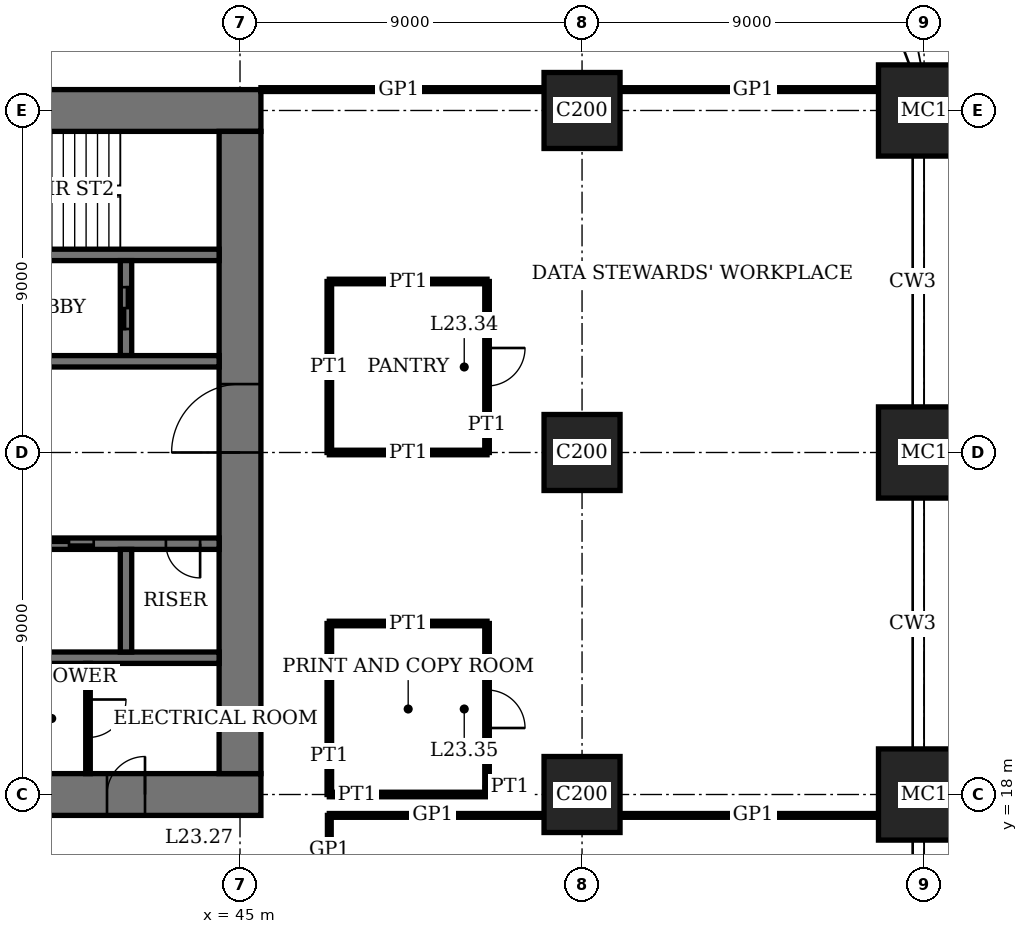
"""IFC4 building model, lengths in metres.
Left out: names, types, materials, properties, quantities, classifications, styles, units other than length and angle.
Written with IfcOpenShell. Run it as: python <this file> out.ifc"""

import sys

from ifc_helpers import new_model, si_unit, direction, frame, frame_2d, origin, origin_2d, place, context, subcontext, project, spatial, rectangle, extrude, element, fill, save


model = new_model("IFC4")
c1 = context("Model", 3, precision=1e-05, world=origin(), true_north=direction((0.0, 1.0)))
c2 = subcontext(c1, "Body", "Model", "MODEL_VIEW")
j1 = project(units=[si_unit("LENGTHUNIT", "METRE"), si_unit("PLANEANGLEUNIT", "RADIAN")], contexts=[c1])
p1 = place(None, origin())
s1 = spatial("IfcSite", under=j1, at=p1, CompositionType="ELEMENT")
p2 = place(p1, origin())
s2 = spatial("IfcBuilding", under=s1, at=p2, CompositionType="ELEMENT")
p3 = place(p2, frame((0.0, 0.0, 97.0)))
s3 = spatial("IfcBuildingStorey", under=s2, at=p3, CompositionType="ELEMENT", Elevation=97.0)
for number, where, z_axis, x_axis in (
    (1, (54.0, 18.0, 0.0), (0.0, 0.0, 1.0), (1.0, 0.0, 0.0)),
    (2, (54.0, 27.0, 0.0), (0.0, 0.0, 1.0), (1.0, 0.0, 0.0)),
    (3, (54.0, 36.0, 0.0), (0.0, 0.0, 1.0), (1.0, 0.0, 0.0)),
):
    element("IfcColumn", number, at=place(p3, frame(where, z_axis=z_axis, x_axis=x_axis)), inside=s3, PredefinedType="COLUMN", context=c2, shape_type="SweptSolid", body=[
        extrude(rectangle(XDim=2.0, YDim=2.0, at=origin_2d()), origin(), (0.0, 0.0, 1.0), 4.0),
    ])
for number, where, z_axis, x_axis in (
    (4, (63.0, 18.0, 0.0), (0.0, 0.0, 1.0), (1.0, 0.0, 0.0)),
    (5, (63.0, 27.0, 0.0), (0.0, 0.0, 1.0), (1.0, 0.0, 0.0)),
    (6, (63.0, 36.0, 0.0), (0.0, 0.0, 1.0), (1.0, 0.0, 0.0)),
):
    element("IfcColumn", number, at=place(p3, frame(where, z_axis=z_axis, x_axis=x_axis)), inside=s3, PredefinedType="COLUMN", context=c2, shape_type="SweptSolid", body=[
        extrude(rectangle(XDim=2.4, YDim=2.4, at=origin_2d()), origin(), (0.0, 0.0, 1.0), 4.0),
    ])
p4 = place(p3, frame((17.45, 18.0, 0.0), z_axis=(0.0, 0.0, 1.0), x_axis=(1.0, 0.0, 0.0)))
e7 = element("IfcWall", 7, at=p4, inside=s3, PredefinedType="SHEAR", context=c2, shape_type="SweptSolid", body=[
    extrude(rectangle(XDim=28.1, YDim=1.1, at=frame_2d((14.05, 0.0))), origin(), (0.0, 0.0, 1.0), 4.0),
])
p5 = place(p4, frame((11.55, 0.0, 0.0)))
e8 = element("IfcOpeningElement", 8, at=p5, cuts=e7, PredefinedType="OPENING", context=c2, shape_type="SweptSolid", body=[
    extrude(rectangle(XDim=1.0, YDim=2.4, at=frame_2d((0.5, 1.2))), frame((0.0, 0.56, 0.0), z_axis=(0.0, -1.0, 0.0), x_axis=(1.0, 0.0, 0.0)), (0.0, 0.0, 1.0), 1.12),
])
p6 = place(p4, frame((16.55, 0.0, 0.0)))
e9 = element("IfcOpeningElement", 9, at=p6, cuts=e7, PredefinedType="OPENING", context=c2, shape_type="SweptSolid", body=[
    extrude(rectangle(XDim=1.0, YDim=2.4, at=frame_2d((0.5, 1.2))), frame((0.0, 0.56, 0.0), z_axis=(0.0, -1.0, 0.0), x_axis=(1.0, 0.0, 0.0)), (0.0, 0.0, 1.0), 1.12),
])
p7 = place(p4, frame((20.0, 0.0, 0.0)))
e10 = element("IfcOpeningElement", 10, at=p7, cuts=e7, PredefinedType="OPENING", context=c2, shape_type="SweptSolid", body=[
    extrude(rectangle(XDim=1.1, YDim=2.4, at=frame_2d((0.55, 1.2))), frame((0.0, 0.56, 0.0), z_axis=(0.0, -1.0, 0.0), x_axis=(1.0, 0.0, 0.0)), (0.0, 0.0, 1.0), 1.12),
])
p8 = place(p4, frame((24.05, 0.0, 0.0)))
e11 = element("IfcOpeningElement", 11, at=p8, cuts=e7, PredefinedType="OPENING", context=c2, shape_type="SweptSolid", body=[
    extrude(rectangle(XDim=1.0, YDim=2.4, at=frame_2d((0.5, 1.2))), frame((0.0, 0.56, 0.0), z_axis=(0.0, -1.0, 0.0), x_axis=(1.0, 0.0, 0.0)), (0.0, 0.0, 1.0), 1.12),
])
p9 = place(p3, frame((45.55, 36.0, 0.0), z_axis=(0.0, 0.0, 1.0), x_axis=(-1.0, 0.0, 0.0)))
e12 = element("IfcWall", 12, at=p9, inside=s3, PredefinedType="SHEAR", context=c2, shape_type="SweptSolid", body=[
    extrude(rectangle(XDim=28.1, YDim=1.1, at=frame_2d((14.05, 0.0))), origin(), (0.0, 0.0, 1.0), 4.0),
])
p10 = place(p9, frame((11.55, 0.0, 0.0)))
e13 = element("IfcOpeningElement", 13, at=p10, cuts=e12, PredefinedType="OPENING", context=c2, shape_type="SweptSolid", body=[
    extrude(rectangle(XDim=1.0, YDim=2.4, at=frame_2d((0.5, 1.2))), frame((0.0, 0.56, 0.0), z_axis=(0.0, -1.0, 0.0), x_axis=(1.0, 0.0, 0.0)), (0.0, 0.0, 1.0), 1.12),
])
p11 = place(p9, frame((16.55, 0.0, 0.0)))
e14 = element("IfcOpeningElement", 14, at=p11, cuts=e12, PredefinedType="OPENING", context=c2, shape_type="SweptSolid", body=[
    extrude(rectangle(XDim=1.0, YDim=2.4, at=frame_2d((0.5, 1.2))), frame((0.0, 0.56, 0.0), z_axis=(0.0, -1.0, 0.0), x_axis=(1.0, 0.0, 0.0)), (0.0, 0.0, 1.0), 1.12),
])
p12 = place(p9, frame((20.0, 0.0, 0.0)))
e15 = element("IfcOpeningElement", 15, at=p12, cuts=e12, PredefinedType="OPENING", context=c2, shape_type="SweptSolid", body=[
    extrude(rectangle(XDim=1.1, YDim=2.4, at=frame_2d((0.55, 1.2))), frame((0.0, 0.56, 0.0), z_axis=(0.0, -1.0, 0.0), x_axis=(1.0, 0.0, 0.0)), (0.0, 0.0, 1.0), 1.12),
])
p13 = place(p9, frame((24.05, 0.0, 0.0)))
e16 = element("IfcOpeningElement", 16, at=p13, cuts=e12, PredefinedType="OPENING", context=c2, shape_type="SweptSolid", body=[
    extrude(rectangle(XDim=1.0, YDim=2.4, at=frame_2d((0.5, 1.2))), frame((0.0, 0.56, 0.0), z_axis=(0.0, -1.0, 0.0), x_axis=(1.0, 0.0, 0.0)), (0.0, 0.0, 1.0), 1.12),
])
p14 = place(p3, frame((45.0, 18.55, 0.0), z_axis=(0.0, 0.0, 1.0), x_axis=(0.0, 1.0, 0.0)))
e17 = element("IfcWall", 17, at=p14, inside=s3, PredefinedType="SHEAR", context=c2, shape_type="SweptSolid", body=[
    extrude(rectangle(XDim=16.9, YDim=1.1, at=frame_2d((8.45, 0.0))), origin(), (0.0, 0.0, 1.0), 4.0),
])
p15 = place(p14, frame((8.45, 0.0, 0.0)))
e18 = element("IfcOpeningElement", 18, at=p15, cuts=e17, PredefinedType="OPENING", context=c2, shape_type="SweptSolid", body=[
    extrude(rectangle(XDim=1.8, YDim=2.4, at=frame_2d((0.9, 1.2))), frame((0.0, 0.56, 0.0), z_axis=(0.0, -1.0, 0.0), x_axis=(1.0, 0.0, 0.0)), (0.0, 0.0, 1.0), 1.12),
])
p16 = place(p3, frame((36.15, 32.2, 0.0), z_axis=(0.0, 0.0, 1.0), x_axis=(1.0, 0.0, 0.0)))
e19 = element("IfcWall", 19, at=p16, inside=s3, PredefinedType="SHEAR", context=c2, shape_type="SweptSolid", body=[
    extrude(rectangle(XDim=8.3, YDim=0.3, at=frame_2d((4.15, 0.0))), origin(), (0.0, 0.0, 1.0), 4.0),
])
p17 = place(p16, frame((0.45, 0.0, 0.0)))
e20 = element("IfcOpeningElement", 20, at=p17, cuts=e19, PredefinedType="OPENING", context=c2, shape_type="SweptSolid", body=[
    extrude(rectangle(XDim=1.0, YDim=2.4, at=frame_2d((0.5, 1.2))), frame((0.0, 0.16, 0.0), z_axis=(0.0, -1.0, 0.0), x_axis=(1.0, 0.0, 0.0)), (0.0, 0.0, 1.0), 0.32),
])
p18 = place(p3, frame((42.0, 29.55, 0.0), z_axis=(0.0, 0.0, 1.0), x_axis=(0.0, 1.0, 0.0)))
e21 = element("IfcWall", 21, at=p18, inside=s3, PredefinedType="SHEAR", context=c2, shape_type="SweptSolid", body=[
    extrude(rectangle(XDim=2.5, YDim=0.3, at=frame_2d((1.25, 0.0))), origin(), (0.0, 0.0, 1.0), 4.0),
])
p19 = place(p18, frame((0.7, 0.0, 0.0)))
e22 = element("IfcOpeningElement", 22, at=p19, cuts=e21, PredefinedType="OPENING", context=c2, shape_type="SweptSolid", body=[
    extrude(rectangle(XDim=1.1, YDim=2.4, at=frame_2d((0.55, 1.2))), frame((0.0, 0.16, 0.0), z_axis=(0.0, -1.0, 0.0), x_axis=(1.0, 0.0, 0.0)), (0.0, 0.0, 1.0), 0.32),
])
p20 = place(p3, frame((18.55, 24.6, 0.0), z_axis=(0.0, 0.0, 1.0), x_axis=(1.0, 0.0, 0.0)))
e23 = element("IfcWall", 23, at=p20, inside=s3, PredefinedType="SHEAR", context=c2, shape_type="SweptSolid", body=[
    extrude(rectangle(XDim=25.9, YDim=0.3, at=frame_2d((12.95, 0.0))), origin(), (0.0, 0.0, 1.0), 4.0),
])
p21 = place(p20, frame((4.95, 0.0, 0.0)))
e24 = element("IfcOpeningElement", 24, at=p21, cuts=e23, PredefinedType="OPENING", context=c2, shape_type="SweptSolid", body=[
    extrude(rectangle(XDim=1.0, YDim=2.4, at=frame_2d((0.5, 1.2))), frame((0.0, 0.16, 0.0), z_axis=(0.0, -1.0, 0.0), x_axis=(1.0, 0.0, 0.0)), (0.0, 0.0, 1.0), 0.32),
])
p22 = place(p20, frame((24.5, 0.0, 0.0)))
e25 = element("IfcOpeningElement", 25, at=p22, cuts=e23, PredefinedType="OPENING", context=c2, shape_type="SweptSolid", body=[
    extrude(rectangle(XDim=0.9, YDim=2.1, at=frame_2d((0.45, 1.05))), frame((0.0, 0.16, 0.0), z_axis=(0.0, -1.0, 0.0), x_axis=(1.0, 0.0, 0.0)), (0.0, 0.0, 1.0), 0.32),
])
p23 = place(p20, frame((21.3, 0.0, 0.0)))
e26 = element("IfcOpeningElement", 26, at=p23, cuts=e23, PredefinedType="OPENING", context=c2, shape_type="SweptSolid", body=[
    extrude(rectangle(XDim=1.3, YDim=2.4, at=frame_2d((0.65, 1.2))), frame((0.0, 0.16, 0.0), z_axis=(0.0, -1.0, 0.0), x_axis=(1.0, 0.0, 0.0)), (0.0, 0.0, 1.0), 0.32),
])
p24 = place(p3, frame((18.55, 29.4, 0.0), z_axis=(0.0, 0.0, 1.0), x_axis=(1.0, 0.0, 0.0)))
e27 = element("IfcWall", 27, at=p24, inside=s3, PredefinedType="SHEAR", context=c2, shape_type="SweptSolid", body=[
    extrude(rectangle(XDim=25.9, YDim=0.3, at=frame_2d((12.95, 0.0))), origin(), (0.0, 0.0, 1.0), 4.0),
])
p25 = place(p24, frame((19.95, 0.0, 0.0)))
e28 = element("IfcOpeningElement", 28, at=p25, cuts=e27, PredefinedType="OPENING", context=c2, shape_type="SweptSolid", body=[
    extrude(rectangle(XDim=1.0, YDim=2.4, at=frame_2d((0.5, 1.2))), frame((0.0, 0.16, 0.0), z_axis=(0.0, -1.0, 0.0), x_axis=(1.0, 0.0, 0.0)), (0.0, 0.0, 1.0), 0.32),
])
p26 = place(p24, frame((0.5, 0.0, 0.0)))
e29 = element("IfcOpeningElement", 29, at=p26, cuts=e27, PredefinedType="OPENING", context=c2, shape_type="SweptSolid", body=[
    extrude(rectangle(XDim=0.9, YDim=2.1, at=frame_2d((0.45, 1.05))), frame((0.0, 0.16, 0.0), z_axis=(0.0, -1.0, 0.0), x_axis=(1.0, 0.0, 0.0)), (0.0, 0.0, 1.0), 0.32),
])
p27 = place(p24, frame((15.4, 0.0, 0.0)))
e30 = element("IfcOpeningElement", 30, at=p27, cuts=e27, PredefinedType="OPENING", context=c2, shape_type="SweptSolid", body=[
    extrude(rectangle(XDim=1.1, YDim=2.4, at=frame_2d((0.55, 1.2))), frame((0.0, 0.16, 0.0), z_axis=(0.0, -1.0, 0.0), x_axis=(1.0, 0.0, 0.0)), (0.0, 0.0, 1.0), 0.32),
])
p28 = place(p24, frame((12.4, 0.0, 0.0)))
e31 = element("IfcOpeningElement", 31, at=p28, cuts=e27, PredefinedType="OPENING", context=c2, shape_type="SweptSolid", body=[
    extrude(rectangle(XDim=1.1, YDim=2.4, at=frame_2d((0.55, 1.2))), frame((0.0, 0.16, 0.0), z_axis=(0.0, -1.0, 0.0), x_axis=(1.0, 0.0, 0.0)), (0.0, 0.0, 1.0), 0.32),
])
p29 = place(p24, frame((3.3, 0.0, 0.0)))
e32 = element("IfcOpeningElement", 32, at=p29, cuts=e27, PredefinedType="OPENING", context=c2, shape_type="SweptSolid", body=[
    extrude(rectangle(XDim=1.3, YDim=2.4, at=frame_2d((0.65, 1.2))), frame((0.0, 0.16, 0.0), z_axis=(0.0, -1.0, 0.0), x_axis=(1.0, 0.0, 0.0)), (0.0, 0.0, 1.0), 0.32),
])
p30 = place(p3, frame((27.15, 21.6, 0.0), z_axis=(0.0, 0.0, 1.0), x_axis=(1.0, 0.0, 0.0)))
e33 = element("IfcWall", 33, at=p30, inside=s3, PredefinedType="SHEAR", context=c2, shape_type="SweptSolid", body=[
    extrude(rectangle(XDim=17.3, YDim=0.3, at=frame_2d((8.65, 0.0))), origin(), (0.0, 0.0, 1.0), 4.0),
])
p31 = place(p3, frame((42.0, 21.75, 0.0), z_axis=(0.0, 0.0, 1.0), x_axis=(0.0, 1.0, 0.0)))
e34 = element("IfcWall", 34, at=p31, inside=s3, PredefinedType="SHEAR", context=c2, shape_type="SweptSolid", body=[
    extrude(rectangle(XDim=2.7, YDim=0.3, at=frame_2d((1.35, 0.0))), origin(), (0.0, 0.0, 1.0), 4.0),
])
p32 = place(p3, frame((47.35, 17.45, 0.0), z_axis=(0.0, 0.0, 1.0), x_axis=(1.0, 0.0, 0.0)))
e35 = element("IfcWall", 35, at=p32, inside=s3, PredefinedType="PARTITIONING", context=c2, shape_type="SweptSolid", body=[
    extrude(rectangle(XDim=5.65, YDim=0.1, at=frame_2d((2.825, 0.0))), origin(), (0.0, 0.0, 1.0), 3.75),
])
p33 = place(p3, frame((55.0, 17.45, 0.0), z_axis=(0.0, 0.0, 1.0), x_axis=(1.0, 0.0, 0.0)))
e36 = element("IfcWall", 36, at=p33, inside=s3, PredefinedType="PARTITIONING", context=c2, shape_type="SweptSolid", body=[
    extrude(rectangle(XDim=6.8, YDim=0.1, at=frame_2d((3.4, 0.0))), origin(), (0.0, 0.0, 1.0), 3.75),
])
p34 = place(p3, frame((47.35, 18.0, 0.0), z_axis=(0.0, 0.0, 1.0), x_axis=(1.0, 0.0, 0.0)))
e37 = element("IfcWall", 37, at=p34, inside=s3, PredefinedType="PARTITIONING", context=c2, shape_type="SweptSolid", body=[
    extrude(rectangle(XDim=4.15, YDim=0.12, at=frame_2d((2.075, 0.0))), origin(), (0.0, 0.0, 1.0), 3.05),
])
p35 = place(p3, frame((47.35, 22.5, 0.0), z_axis=(0.0, 0.0, 1.0), x_axis=(1.0, 0.0, 0.0)))
e38 = element("IfcWall", 38, at=p35, inside=s3, PredefinedType="PARTITIONING", context=c2, shape_type="SweptSolid", body=[
    extrude(rectangle(XDim=4.15, YDim=0.12, at=frame_2d((2.075, 0.0))), origin(), (0.0, 0.0, 1.0), 3.1),
])
p36 = place(p3, frame((47.35, 27.0, 0.0), z_axis=(0.0, 0.0, 1.0), x_axis=(1.0, 0.0, 0.0)))
e39 = element("IfcWall", 39, at=p36, inside=s3, PredefinedType="PARTITIONING", context=c2, shape_type="SweptSolid", body=[
    extrude(rectangle(XDim=4.15, YDim=0.12, at=frame_2d((2.075, 0.0))), origin(), (0.0, 0.0, 1.0), 3.05),
])
p37 = place(p3, frame((47.35, 31.5, 0.0), z_axis=(0.0, 0.0, 1.0), x_axis=(1.0, 0.0, 0.0)))
e40 = element("IfcWall", 40, at=p37, inside=s3, PredefinedType="PARTITIONING", context=c2, shape_type="SweptSolid", body=[
    extrude(rectangle(XDim=4.15, YDim=0.12, at=frame_2d((2.075, 0.0))), origin(), (0.0, 0.0, 1.0), 3.1),
])
p38 = place(p3, frame((45.55, 36.55, 0.0), z_axis=(0.0, 0.0, 1.0), x_axis=(1.0, 0.0, 0.0)))
e41 = element("IfcWall", 41, at=p38, inside=s3, PredefinedType="PARTITIONING", context=c2, shape_type="SweptSolid", body=[
    extrude(rectangle(XDim=7.45, YDim=0.1, at=frame_2d((3.725, 0.0))), origin(), (0.0, 0.0, 1.0), 3.75),
])
p39 = place(p3, frame((55.0, 36.55, 0.0), z_axis=(0.0, 0.0, 1.0), x_axis=(1.0, 0.0, 0.0)))
e42 = element("IfcWall", 42, at=p39, inside=s3, PredefinedType="PARTITIONING", context=c2, shape_type="SweptSolid", body=[
    extrude(rectangle(XDim=6.8, YDim=0.1, at=frame_2d((3.4, 0.0))), origin(), (0.0, 0.0, 1.0), 3.75),
])
for number, where, z_axis, x_axis in (
    (43, (47.35, 27.0, 0.0), (0.0, 0.0, 1.0), (0.0, 1.0, 0.0)),
    (44, (47.35, 18.0, 0.0), (0.0, 0.0, 1.0), (0.0, 1.0, 0.0)),
):
    element("IfcWall", number, at=place(p3, frame(where, z_axis=z_axis, x_axis=x_axis)), inside=s3, PredefinedType="PARTITIONING", context=c2, shape_type="SweptSolid", body=[
        extrude(rectangle(XDim=4.5, YDim=0.12, at=frame_2d((2.25, 0.0))), origin(), (0.0, 0.0, 1.0), 3.75),
    ])
p40 = place(p3, frame((47.35, 15.65, 0.0), z_axis=(0.0, 0.0, 1.0), x_axis=(0.0, 1.0, 0.0)))
e45 = element("IfcWall", 45, at=p40, inside=s3, PredefinedType="PARTITIONING", context=c2, shape_type="SweptSolid", body=[
    extrude(rectangle(XDim=1.8, YDim=0.1, at=frame_2d((0.9, 0.0))), origin(), (0.0, 0.0, 1.0), 3.75),
])
p41 = place(p3, frame((51.5, 27.0, 0.0), z_axis=(0.0, 0.0, 1.0), x_axis=(0.0, 1.0, 0.0)))
e46 = element("IfcWall", 46, at=p41, inside=s3, PredefinedType="PARTITIONING", context=c2, shape_type="SweptSolid", body=[
    extrude(rectangle(XDim=4.5, YDim=0.12, at=frame_2d((2.25, 0.0))), origin(), (0.0, 0.0, 1.0), 3.75),
])
p42 = place(p41, frame((1.75, 0.0, 0.0)))
e47 = element("IfcOpeningElement", 47, at=p42, cuts=e46, PredefinedType="OPENING", context=c2, shape_type="SweptSolid", body=[
    extrude(rectangle(XDim=1.0, YDim=2.4, at=frame_2d((0.5, 1.2))), frame((0.0, 0.07, 0.0), z_axis=(0.0, -1.0, 0.0), x_axis=(1.0, 0.0, 0.0)), (0.0, 0.0, 1.0), 0.14),
])
p43 = place(p3, frame((51.5, 18.0, 0.0), z_axis=(0.0, 0.0, 1.0), x_axis=(0.0, 1.0, 0.0)))
e48 = element("IfcWall", 48, at=p43, inside=s3, PredefinedType="PARTITIONING", context=c2, shape_type="SweptSolid", body=[
    extrude(rectangle(XDim=4.5, YDim=0.12, at=frame_2d((2.25, 0.0))), origin(), (0.0, 0.0, 1.0), 3.75),
])
p44 = place(p43, frame((1.75, 0.0, 0.0)))
e49 = element("IfcOpeningElement", 49, at=p44, cuts=e48, PredefinedType="OPENING", context=c2, shape_type="SweptSolid", body=[
    extrude(rectangle(XDim=1.0, YDim=2.4, at=frame_2d((0.5, 1.2))), frame((0.0, 0.07, 0.0), z_axis=(0.0, -1.0, 0.0), x_axis=(1.0, 0.0, 0.0)), (0.0, 0.0, 1.0), 0.14),
])
p45 = place(p3, frame((41.0, 18.55, 0.0), z_axis=(0.0, 0.0, 1.0), x_axis=(0.0, 1.0, 0.0)))
e50 = element("IfcWall", 50, at=p45, inside=s3, PredefinedType="PARTITIONING", context=c2, shape_type="SweptSolid", body=[
    extrude(rectangle(XDim=2.9, YDim=0.12, at=frame_2d((1.45, 0.0))), origin(), (0.0, 0.0, 1.0), 3.75),
])
p46 = place(p45, frame((0.95, 0.0, 0.0)))
e51 = element("IfcOpeningElement", 51, at=p46, cuts=e50, PredefinedType="OPENING", context=c2, shape_type="SweptSolid", body=[
    extrude(rectangle(XDim=1.0, YDim=2.4, at=frame_2d((0.5, 1.2))), frame((0.0, 0.07, 0.0), z_axis=(0.0, -1.0, 0.0), x_axis=(1.0, 0.0, 0.0)), (0.0, 0.0, 1.0), 0.14),
])
p47 = place(p15, origin())
e52 = element("IfcDoor", 52, at=p47, inside=s3, OperationType="DOUBLE_DOOR_DOUBLE_SWING", PredefinedType="DOOR", context=c2, shape_type="SweptSolid", body=[
    extrude(rectangle(XDim=1.8, YDim=2.4, at=frame_2d((0.9, 1.2))), frame((0.0, 0.03, 0.0), z_axis=(0.0, -1.0, 0.0), x_axis=(1.0, 0.0, 0.0)), (0.0, 0.0, 1.0), 0.06),
    extrude(rectangle(XDim=0.04, YDim=2.4, at=frame_2d((0.02, 1.2))), frame((0.0, 0.55, 0.0), z_axis=(0.0, -1.0, 0.0), x_axis=(1.0, 0.0, 0.0)), (0.0, 0.0, 1.0), 1.1),
    extrude(rectangle(XDim=0.04, YDim=2.4, at=frame_2d((1.78, 1.2))), frame((0.0, 0.55, 0.0), z_axis=(0.0, -1.0, 0.0), x_axis=(1.0, 0.0, 0.0)), (0.0, 0.0, 1.0), 1.1),
    extrude(rectangle(XDim=1.8, YDim=0.04, at=frame_2d((0.9, 2.38))), frame((0.0, 0.55, 0.0), z_axis=(0.0, -1.0, 0.0), x_axis=(1.0, 0.0, 0.0)), (0.0, 0.0, 1.0), 1.1),
])
fill(e18, e52)
p48 = place(p8, origin())
e53 = element("IfcDoor", 53, at=p48, inside=s3, OperationType="SINGLE_SWING_LEFT", PredefinedType="DOOR", context=c2, shape_type="SweptSolid", body=[
    extrude(rectangle(XDim=1.0, YDim=2.4, at=frame_2d((0.5, 1.2))), frame((0.0, 0.025, 0.0), z_axis=(0.0, -1.0, 0.0), x_axis=(1.0, 0.0, 0.0)), (0.0, 0.0, 1.0), 0.05),
    extrude(rectangle(XDim=0.04, YDim=2.4, at=frame_2d((0.02, 1.2))), frame((0.0, 0.4, 0.0), z_axis=(0.0, -1.0, 0.0), x_axis=(1.0, 0.0, 0.0)), (0.0, 0.0, 1.0), 0.8),
    extrude(rectangle(XDim=0.04, YDim=2.4, at=frame_2d((0.98, 1.2))), frame((0.0, 0.4, 0.0), z_axis=(0.0, -1.0, 0.0), x_axis=(1.0, 0.0, 0.0)), (0.0, 0.0, 1.0), 0.8),
    extrude(rectangle(XDim=1.0, YDim=0.04, at=frame_2d((0.5, 2.38))), frame((0.0, 0.4, 0.0), z_axis=(0.0, -1.0, 0.0), x_axis=(1.0, 0.0, 0.0)), (0.0, 0.0, 1.0), 0.8),
])
fill(e11, e53)
p49 = place(p22, origin())
e54 = element("IfcDoor", 54, at=p49, inside=s3, OperationType="SINGLE_SWING_RIGHT", PredefinedType="DOOR", context=c2, shape_type="SweptSolid", body=[
    extrude(rectangle(XDim=0.9, YDim=2.1, at=frame_2d((0.45, 1.05))), frame((0.0, 0.03, 0.0), z_axis=(0.0, -1.0, 0.0), x_axis=(1.0, 0.0, 0.0)), (0.0, 0.0, 1.0), 0.06),
])
fill(e25, e54)
p50 = place(p42, origin())
e55 = element("IfcDoor", 55, at=p50, inside=s3, OperationType="SINGLE_SWING_RIGHT", PredefinedType="DOOR", context=c2, shape_type="SweptSolid", body=[
    extrude(rectangle(XDim=1.0, YDim=2.4, at=frame_2d((0.5, 1.2))), frame((0.0, 0.025, 0.0), z_axis=(0.0, -1.0, 0.0), x_axis=(1.0, 0.0, 0.0)), (0.0, 0.0, 1.0), 0.05),
])
fill(e47, e55)
p51 = place(p44, origin())
e56 = element("IfcDoor", 56, at=p51, inside=s3, OperationType="SINGLE_SWING_LEFT", PredefinedType="DOOR", context=c2, shape_type="SweptSolid", body=[
    extrude(rectangle(XDim=1.0, YDim=2.4, at=frame_2d((0.5, 1.2))), frame((0.0, 0.025, 0.0), z_axis=(0.0, -1.0, 0.0), x_axis=(1.0, 0.0, 0.0)), (0.0, 0.0, 1.0), 0.05),
])
fill(e49, e56)
p52 = place(p46, origin())
e57 = element("IfcDoor", 57, at=p52, inside=s3, OperationType="SINGLE_SWING_RIGHT", PredefinedType="DOOR", context=c2, shape_type="SweptSolid", body=[
    extrude(rectangle(XDim=1.0, YDim=2.4, at=frame_2d((0.5, 1.2))), frame((0.0, 0.03, 0.0), z_axis=(0.0, -1.0, 0.0), x_axis=(1.0, 0.0, 0.0)), (0.0, 0.0, 1.0), 0.06),
])
fill(e51, e57)
p53 = place(p23, origin())
e58 = element("IfcDoor", 58, at=p53, inside=s3, OperationType="DOUBLE_DOOR_SLIDING", PredefinedType="DOOR", context=c2, shape_type="SweptSolid", body=[
    extrude(rectangle(XDim=1.3, YDim=2.4, at=frame_2d((0.65, 1.2))), frame((0.0, 0.02, 0.0), z_axis=(0.0, -1.0, 0.0), x_axis=(1.0, 0.0, 0.0)), (0.0, 0.0, 1.0), 0.04),
])
fill(e26, e58)
p54 = place(p19, origin())
e59 = element("IfcDoor", 59, at=p54, inside=s3, OperationType="DOUBLE_DOOR_SLIDING", PredefinedType="DOOR", context=c2, shape_type="SweptSolid", body=[
    extrude(rectangle(XDim=1.1, YDim=2.4, at=frame_2d((0.55, 1.2))), frame((0.0, 0.03, 0.0), z_axis=(0.0, -1.0, 0.0), x_axis=(1.0, 0.0, 0.0)), (0.0, 0.0, 1.0), 0.06),
])
fill(e22, e59)
save(model, sys.argv[1])
